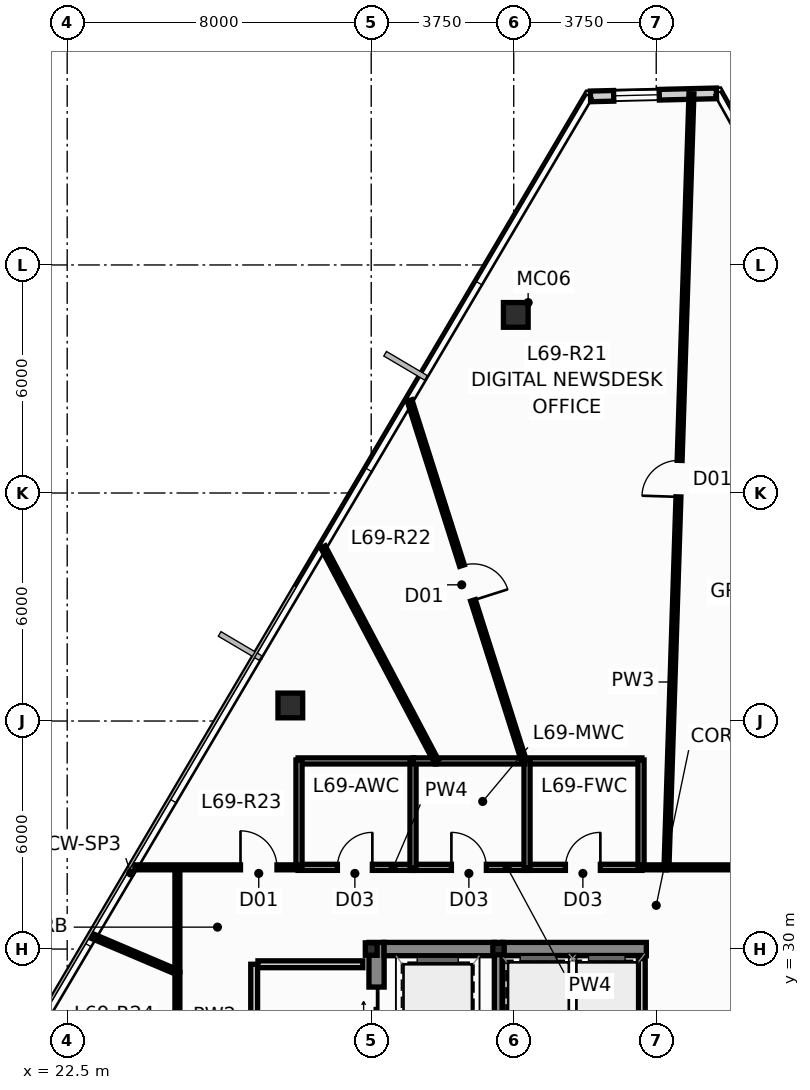
"""IFC4 building model, lengths in metres.
Left out: names, types, materials, properties, quantities, classifications, styles, units other than length and angle.
Written with IfcOpenShell. Run it as: python <this file> out.ifc"""

import sys

from ifc_helpers import new_model, si_unit, direction, frame, frame_2d, origin, origin_2d, place, context, subcontext, project, spatial, rectangle, hollow_rectangle, i_section, extrude, source, transform, mapped, element, fill, save


model = new_model("IFC4")
c1 = context("Model", 3, precision=1e-05, world=origin(), true_north=direction((0.0, 1.0)))
c2 = subcontext(c1, "Body", "Model", "MODEL_VIEW")
j1 = project(units=[si_unit("LENGTHUNIT", "METRE"), si_unit("PLANEANGLEUNIT", "RADIAN")], contexts=[c1])
p1 = place(None, origin())
s1 = spatial("IfcSite", under=j1, at=p1, CompositionType="ELEMENT")
p2 = place(p1, origin())
s2 = spatial("IfcBuilding", under=s1, at=p2, CompositionType="ELEMENT")
p3 = place(p2, frame((0.0, 0.0, 262.7)))
s3 = spatial("IfcBuildingStorey", under=s2, at=p3, CompositionType="ELEMENT", Elevation=262.7)
m1 = source(origin(), c2, "Body", "SweptSolid", [
    extrude(i_section(OverallWidth=0.311, OverallDepth=0.327, WebThickness=0.016, FlangeThickness=0.025, at=origin_2d()), origin(), (0.0, 0.0, 1.0), 3.65),
])
p4 = place(p3, frame((30.5, 30.0, 0.0), z_axis=(0.0, 0.0, 1.0), x_axis=(1.0, 0.0, 0.0)))
e1 = element("IfcColumn", 1, at=p4, inside=s3, PredefinedType="COLUMN", context=c2, shape_type="MappedRepresentation", body=[
    mapped(m1, transform((0.0, 0.0, 0.0), scale=1.0)),
])
m2 = source(origin(), c2, "Body", "SweptSolid", [
    extrude(hollow_rectangle(XDim=0.3, YDim=0.3, WallThickness=0.012, at=origin_2d()), origin(), (0.0, 0.0, 1.0), 3.65),
])
p5 = place(p3, frame((33.85, 30.0, 0.0), z_axis=(0.0, 0.0, 1.0), x_axis=(1.0, 0.0, 0.0)))
e2 = element("IfcColumn", 2, at=p5, inside=s3, PredefinedType="COLUMN", context=c2, shape_type="MappedRepresentation", body=[
    mapped(m2, transform((0.0, 0.0, 0.0), scale=1.0)),
])
p6 = place(p3, frame((30.64, 17.05, 0.0), z_axis=(0.0, 0.0, 1.0), x_axis=(0.0, 1.0, 0.0)))
e3 = element("IfcWall", 3, at=p6, inside=s3, PredefinedType="SHEAR", context=c2, shape_type="SweptSolid", body=[
    extrude(rectangle(XDim=13.125, YDim=0.4, at=frame_2d((6.562, 0.0))), origin(), (0.0, 0.0, 1.0), 3.65),
])
p7 = place(p6, frame((6.3, 0.0, 0.0)))
e4 = element("IfcOpeningElement", 4, at=p7, cuts=e3, PredefinedType="OPENING", context=c2, shape_type="SweptSolid", body=[
    extrude(rectangle(XDim=1.12, YDim=2.15, at=frame_2d((0.56, 1.075))), frame((0.0, 0.212, 0.0), z_axis=(0.0, -1.0, 0.0), x_axis=(1.0, 0.0, 0.0)), (0.0, 0.0, 1.0), 0.424),
])
p8 = place(p6, frame((10.75, 0.0, 0.0)))
e5 = element("IfcOpeningElement", 5, at=p8, cuts=e3, PredefinedType="OPENING", context=c2, shape_type="SweptSolid", body=[
    extrude(rectangle(XDim=1.2, YDim=2.2, at=frame_2d((0.6, 1.1))), frame((0.0, 0.212, 0.0), z_axis=(0.0, -1.0, 0.0), x_axis=(1.0, 0.0, 0.0)), (0.0, 0.0, 1.0), 0.424),
])
p9 = place(p3, frame((30.84, 30.0, 0.0), z_axis=(0.0, 0.0, 1.0), x_axis=(1.0, 0.0, 0.0)))
e6 = element("IfcWall", 6, at=p9, inside=s3, PredefinedType="SHEAR", context=c2, shape_type="SweptSolid", body=[
    extrude(rectangle(XDim=2.9, YDim=0.35, at=frame_2d((1.45, 0.0))), origin(), (0.0, 0.0, 1.0), 3.65),
])
p10 = place(p3, frame((33.96, 30.0, 0.0), z_axis=(0.0, 0.0, 1.0), x_axis=(1.0, 0.0, 0.0)))
e7 = element("IfcWall", 7, at=p10, inside=s3, PredefinedType="SHEAR", context=c2, shape_type="SweptSolid", body=[
    extrude(rectangle(XDim=3.78, YDim=0.35, at=frame_2d((1.89, 0.0))), origin(), (0.0, 0.0, 1.0), 3.65),
])
p11 = place(p3, frame((33.85, 17.05, 0.0), z_axis=(0.0, 0.0, 1.0), x_axis=(0.0, 1.0, 0.0)))
e8 = element("IfcWall", 8, at=p11, inside=s3, PredefinedType="SHEAR", context=c2, shape_type="SweptSolid", body=[
    extrude(rectangle(XDim=13.125, YDim=0.22, at=frame_2d((6.562, 0.0))), origin(), (0.0, 0.0, 1.0), 3.65),
])
m3 = source(origin(), c2, "Body", "SweptSolid", [
    extrude(hollow_rectangle(XDim=0.65, YDim=0.65, WallThickness=0.04, at=origin_2d()), origin(), (0.0, 0.0, 1.0), 3.651),
])
p12 = place(p3, frame((34.304, 46.686, 0.0), z_axis=(0.023871161178, 0.00173851594, 0.999713531581), x_axis=(-0.07263675076, 0.997358462359, 0.0)))
e9 = element("IfcColumn", 9, at=p12, inside=s3, PredefinedType="COLUMN", context=c2, shape_type="MappedRepresentation", body=[
    mapped(m3, transform((0.0, 0.0, 0.0), scale=1.0)),
])
m4 = source(origin(), c2, "Body", "SweptSolid", [
    extrude(hollow_rectangle(XDim=0.65, YDim=0.65, WallThickness=0.04, at=origin_2d()), origin(), (0.0, 0.0, 1.0), 3.651),
])
p13 = place(p3, frame((28.372, 36.41, 0.0), z_axis=(0.01939269685, -0.00601842316, 0.999793829693), x_axis=(0.296399214872, 0.955064136811, 0.0)))
e10 = element("IfcColumn", 10, at=p13, inside=s3, PredefinedType="COLUMN", context=c2, shape_type="MappedRepresentation", body=[
    mapped(m4, transform((0.0, 0.0, 0.0), scale=1.0)),
])
p14 = place(p3, frame((36.27, 52.436, 0.0), z_axis=(0.0, 0.0, 1.0), x_axis=(0.999711728511, 0.024009578864, 0.0)))
e11 = element("IfcWall", 11, at=p14, inside=s3, PredefinedType="STANDARD", context=c2, shape_type="SweptSolid", body=[
    extrude(rectangle(XDim=3.315, YDim=0.28, at=frame_2d((1.657, 0.0))), origin(), (0.0, 0.0, 1.0), 3.4),
])
p15 = place(p14, frame((0.61, 0.0, 0.9)))
e12 = element("IfcOpeningElement", 12, at=p15, cuts=e11, PredefinedType="OPENING", context=c2, shape_type="SweptSolid", body=[
    extrude(rectangle(XDim=1.2, YDim=1.65, at=frame_2d((0.6, 0.825))), frame((0.0, 0.152, 0.0), z_axis=(0.0, -1.0, 0.0), x_axis=(1.0, 0.0, 0.0)), (0.0, 0.0, 1.0), 0.304),
])
p16 = place(p3, frame((37.62, 27.64, 0.0), z_axis=(0.0, 0.0, 1.0), x_axis=(0.0, 1.0, 0.0)))
e13 = element("IfcWall", 13, at=p16, inside=s3, PredefinedType="PARTITIONING", context=c2, shape_type="SweptSolid", body=[
    extrude(rectangle(XDim=2.11, YDim=0.18, at=frame_2d((1.055, 0.0))), origin(), (0.0, 0.0, 1.0), 3.4),
])
p17 = place(p3, frame((27.42, 23.2, 0.0), z_axis=(0.0, 0.0, 1.0), x_axis=(0.0, 1.0, 0.0)))
e14 = element("IfcWall", 14, at=p17, inside=s3, PredefinedType="PARTITIONING", context=c2, shape_type="SweptSolid", body=[
    extrude(rectangle(XDim=6.4, YDim=0.18, at=frame_2d((3.2, 0.0))), origin(), (0.0, 0.0, 1.0), 3.085),
])
p18 = place(p17, frame((2.65, 0.0, 0.0)))
e15 = element("IfcOpeningElement", 15, at=p18, cuts=e14, PredefinedType="OPENING", context=c2, shape_type="SweptSolid", body=[
    extrude(rectangle(XDim=1.05, YDim=2.15, at=frame_2d((0.525, 1.075))), frame((0.0, 0.102, 0.0), z_axis=(0.0, -1.0, 0.0), x_axis=(1.0, 0.0, 0.0)), (0.0, 0.0, 1.0), 0.204),
])
p19 = place(p3, frame((27.52, 29.6, 0.0), z_axis=(0.0, 0.0, 1.0), x_axis=(1.0, 0.0, 0.0)))
e16 = element("IfcWall", 16, at=p19, inside=s3, PredefinedType="PARTITIONING", context=c2, shape_type="SweptSolid", body=[
    extrude(rectangle(XDim=2.76, YDim=0.18, at=frame_2d((1.38, 0.0))), origin(), (0.0, 0.0, 1.0), 3.4),
])
p20 = place(p3, frame((28.575, 32.15, 0.0), z_axis=(0.0, 0.0, 1.0), x_axis=(1.0, 0.0, 0.0)))
e17 = element("IfcWall", 17, at=p20, inside=s3, PredefinedType="PLUMBINGWALL", context=c2, shape_type="SweptSolid", body=[
    extrude(rectangle(XDim=3.05, YDim=0.16, at=frame_2d((1.525, 0.0))), origin(), (0.0, 0.0, 1.0), 3.085),
])
p21 = place(p20, frame((1.035, 0.0, 0.0)))
e18 = element("IfcOpeningElement", 18, at=p21, cuts=e17, PredefinedType="OPENING", context=c2, shape_type="SweptSolid", body=[
    extrude(rectangle(XDim=0.92, YDim=2.1, at=frame_2d((0.46, 1.05))), frame((0.0, 0.092, 0.0), z_axis=(0.0, -1.0, 0.0), x_axis=(1.0, 0.0, 0.0)), (0.0, 0.0, 1.0), 0.184),
])
p22 = place(p3, frame((31.575, 32.15, 0.0), z_axis=(0.0, 0.0, 1.0), x_axis=(1.0, 0.0, 0.0)))
e19 = element("IfcWall", 19, at=p22, inside=s3, PredefinedType="PLUMBINGWALL", context=c2, shape_type="SweptSolid", body=[
    extrude(rectangle(XDim=3.05, YDim=0.16, at=frame_2d((1.525, 0.0))), origin(), (0.0, 0.0, 1.0), 3.085),
])
p23 = place(p22, frame((1.035, 0.0, 0.0)))
e20 = element("IfcOpeningElement", 20, at=p23, cuts=e19, PredefinedType="OPENING", context=c2, shape_type="SweptSolid", body=[
    extrude(rectangle(XDim=0.92, YDim=2.1, at=frame_2d((0.46, 1.05))), frame((0.0, 0.092, 0.0), z_axis=(0.0, -1.0, 0.0), x_axis=(1.0, 0.0, 0.0)), (0.0, 0.0, 1.0), 0.184),
])
p24 = place(p3, frame((34.575, 32.15, 0.0), z_axis=(0.0, 0.0, 1.0), x_axis=(1.0, 0.0, 0.0)))
e21 = element("IfcWall", 21, at=p24, inside=s3, PredefinedType="PLUMBINGWALL", context=c2, shape_type="SweptSolid", body=[
    extrude(rectangle(XDim=3.05, YDim=0.16, at=frame_2d((1.525, 0.0))), origin(), (0.0, 0.0, 1.0), 3.085),
])
p25 = place(p24, frame((1.035, 0.0, 0.0)))
e22 = element("IfcOpeningElement", 22, at=p25, cuts=e21, PredefinedType="OPENING", context=c2, shape_type="SweptSolid", body=[
    extrude(rectangle(XDim=0.92, YDim=2.1, at=frame_2d((0.46, 1.05))), frame((0.0, 0.092, 0.0), z_axis=(0.0, -1.0, 0.0), x_axis=(1.0, 0.0, 0.0)), (0.0, 0.0, 1.0), 0.184),
])
for number, where, z_axis, x_axis in (
    (23, (28.575, 34.95, 0.0), (0.0, 0.0, 1.0), (1.0, 0.0, 0.0)),
    (24, (37.625, 34.95, 0.0), (0.0, 0.0, 1.0), (-1.0, 0.0, 0.0)),
):
    element("IfcWall", number, at=place(p3, frame(where, z_axis=z_axis, x_axis=x_axis)), inside=s3, PredefinedType="PLUMBINGWALL", context=c2, shape_type="SweptSolid", body=[
        extrude(rectangle(XDim=3.05, YDim=0.16, at=frame_2d((1.525, 0.0))), origin(), (0.0, 0.0, 1.0), 3.085),
    ])
for number, where, z_axis, x_axis in (
    (25, (31.6, 32.125, 0.0), (0.0, 0.0, 1.0), (0.0, 1.0, 0.0)),
    (26, (28.6, 32.125, 0.0), (0.0, 0.0, 1.0), (0.0, 1.0, 0.0)),
):
    element("IfcWall", number, at=place(p3, frame(where, z_axis=z_axis, x_axis=x_axis)), inside=s3, PredefinedType="PLUMBINGWALL", context=c2, shape_type="SweptSolid", body=[
        extrude(rectangle(XDim=2.85, YDim=0.16, at=frame_2d((1.425, 0.0))), origin(), (0.0, 0.0, 1.0), 2.985),
    ])
for number, where, z_axis, x_axis in (
    (27, (34.6, 32.125, 0.0), (0.0, 0.0, 1.0), (0.0, 1.0, 0.0)),
    (28, (37.6, 32.125, 0.0), (0.0, 0.0, 1.0), (0.0, 1.0, 0.0)),
):
    element("IfcWall", number, at=place(p3, frame(where, z_axis=z_axis, x_axis=x_axis)), inside=s3, PredefinedType="PLUMBINGWALL", context=c2, shape_type="SweptSolid", body=[
        extrude(rectangle(XDim=2.85, YDim=0.16, at=frame_2d((1.425, 0.0))), origin(), (0.0, 0.0, 1.0), 3.4),
    ])
p26 = place(p3, frame((32.185, 34.95, 0.0), z_axis=(0.0, 0.0, 1.0), x_axis=(1.0, 0.0, 0.0)))
e29 = element("IfcWall", 29, at=p26, inside=s3, PredefinedType="PLUMBINGWALL", context=c2, shape_type="SweptSolid", body=[
    extrude(rectangle(XDim=2.36, YDim=0.16, at=frame_2d((1.18, 0.0))), origin(), (0.0, 0.0, 1.0), 3.085),
])
p27 = place(p3, frame((31.605, 34.95, 0.0), z_axis=(0.0, 0.0, 1.0), x_axis=(1.0, 0.0, 0.0)))
e30 = element("IfcWall", 30, at=p27, inside=s3, PredefinedType="PLUMBINGWALL", context=c2, shape_type="SweptSolid", body=[
    extrude(rectangle(XDim=0.6, YDim=0.16, at=frame_2d((0.3, 0.0))), origin(), (0.0, 0.0, 1.0), 3.085),
])
p28 = place(p3, frame((38.27, 32.155, 0.0), z_axis=(0.0, 0.0, 1.0), x_axis=(0.032268342776, 0.999479241433, 0.0)))
e31 = element("IfcWall", 31, at=p28, inside=s3, PredefinedType="PARTITIONING", context=c2, shape_type="SweptSolid", body=[
    extrude(rectangle(XDim=20.36, YDim=0.13, at=frame_2d((10.18, 0.0))), origin(), (0.0, 0.0, 1.0), 3.4),
])
p29 = place(p28, frame((9.748, 0.0, 0.0)))
e32 = element("IfcOpeningElement", 32, at=p29, cuts=e31, PredefinedType="OPENING", context=c2, shape_type="SweptSolid", body=[
    extrude(rectangle(XDim=0.96, YDim=2.15, at=frame_2d((0.48, 1.075))), frame((0.0, 0.077, 0.0), z_axis=(0.0, -1.0, 0.0), x_axis=(1.0, 0.0, 0.0)), (0.0, 0.0, 1.0), 0.154),
])
p30 = place(p3, frame((31.51, 44.435, 0.0), z_axis=(0.0, 0.0, 1.0), x_axis=(0.302483210132, -0.953154713353, 0.0)))
e33 = element("IfcWall", 33, at=p30, inside=s3, PredefinedType="PARTITIONING", context=c2, shape_type="SweptSolid", body=[
    extrude(rectangle(XDim=9.946, YDim=0.13, at=frame_2d((4.973, 0.0))), origin(), (0.0, 0.0, 1.0), 3.4),
])
p31 = place(p30, frame((4.559, 0.0, 0.0)))
e34 = element("IfcOpeningElement", 34, at=p31, cuts=e33, PredefinedType="OPENING", context=c2, shape_type="SweptSolid", body=[
    extrude(rectangle(XDim=0.96, YDim=2.15, at=frame_2d((0.48, 1.075))), frame((0.0, 0.077, 0.0), z_axis=(0.0, -1.0, 0.0), x_axis=(1.0, 0.0, 0.0)), (0.0, 0.0, 1.0), 0.154),
])
p32 = place(p3, frame((25.4, 22.775, 0.0), z_axis=(0.0, 0.0, 1.0), x_axis=(0.0, 1.0, 0.0)))
e35 = element("IfcWall", 35, at=p32, inside=s3, PredefinedType="PARTITIONING", context=c2, shape_type="SweptSolid", body=[
    extrude(rectangle(XDim=6.61, YDim=0.13, at=frame_2d((3.305, 0.0))), origin(), (0.0, 0.0, 1.0), 3.085),
])
p33 = place(p32, frame((2.825, 0.0, 0.0)))
e36 = element("IfcOpeningElement", 36, at=p33, cuts=e35, PredefinedType="OPENING", context=c2, shape_type="SweptSolid", body=[
    extrude(rectangle(XDim=0.96, YDim=2.15, at=frame_2d((0.48, 1.075))), frame((0.0, 0.077, 0.0), z_axis=(0.0, -1.0, 0.0), x_axis=(1.0, 0.0, 0.0)), (0.0, 0.0, 1.0), 0.154),
])
p34 = place(p3, frame((29.233, 40.58, 0.0), z_axis=(0.0, 0.0, 1.0), x_axis=(0.467475229749, -0.884006170551, 0.0)))
e37 = element("IfcWall", 37, at=p34, inside=s3, PredefinedType="PARTITIONING", context=c2, shape_type="SweptSolid", body=[
    extrude(rectangle(XDim=6.364, YDim=0.13, at=frame_2d((3.182, 0.0))), origin(), (0.0, 0.0, 1.0), 3.4),
])
p35 = place(p3, frame((38.275, 32.15, 0.0), z_axis=(0.0, 0.0, 1.0), x_axis=(1.0, 0.0, 0.0)))
e38 = element("IfcWall", 38, at=p35, inside=s3, PredefinedType="PARTITIONING", context=c2, shape_type="SweptSolid", body=[
    extrude(rectangle(XDim=4.54, YDim=0.13, at=frame_2d((2.27, 0.0))), origin(), (0.0, 0.0, 1.0), 3.085),
])
p36 = place(p35, frame((1.79, 0.0, 0.0)))
e39 = element("IfcOpeningElement", 39, at=p36, cuts=e38, PredefinedType="OPENING", context=c2, shape_type="SweptSolid", body=[
    extrude(rectangle(XDim=0.96, YDim=2.15, at=frame_2d((0.48, 1.075))), frame((0.0, 0.077, 0.0), z_axis=(0.0, -1.0, 0.0), x_axis=(1.0, 0.0, 0.0)), (0.0, 0.0, 1.0), 0.154),
])
p37 = place(p3, frame((24.28, 32.15, 0.0), z_axis=(0.0, 0.0, 1.0), x_axis=(1.0, 0.0, 0.0)))
e40 = element("IfcWall", 40, at=p37, inside=s3, PredefinedType="PARTITIONING", context=c2, shape_type="SweptSolid", body=[
    extrude(rectangle(XDim=4.315, YDim=0.13, at=frame_2d((2.157, 0.0))), origin(), (0.0, 0.0, 1.0), 3.4),
])
p38 = place(p37, frame((2.78, 0.0, 0.0)))
e41 = element("IfcOpeningElement", 41, at=p38, cuts=e40, PredefinedType="OPENING", context=c2, shape_type="SweptSolid", body=[
    extrude(rectangle(XDim=0.96, YDim=2.15, at=frame_2d((0.48, 1.075))), frame((0.0, 0.077, 0.0), z_axis=(0.0, -1.0, 0.0), x_axis=(1.0, 0.0, 0.0)), (0.0, 0.0, 1.0), 0.154),
])
p39 = place(p3, frame((25.4, 29.395, 0.0), z_axis=(0.0, 0.0, 1.0), x_axis=(0.0, 1.0, 0.0)))
e42 = element("IfcWall", 42, at=p39, inside=s3, PredefinedType="PARTITIONING", context=c2, shape_type="SweptSolid", body=[
    extrude(rectangle(XDim=2.75, YDim=0.13, at=frame_2d((1.375, 0.0))), origin(), (0.0, 0.0, 1.0), 3.4),
])
p40 = place(p3, frame((23.181, 30.332, 0.0), z_axis=(0.0, 0.0, 1.0), x_axis=(0.920577358603, -0.390560272977, 0.0)))
e43 = element("IfcWall", 43, at=p40, inside=s3, PredefinedType="PARTITIONING", context=c2, shape_type="SweptSolid", body=[
    extrude(rectangle(XDim=2.406, YDim=0.13, at=frame_2d((1.203, 0.0))), origin(), (0.0, 0.0, 1.0), 3.4),
])
p41 = place(p3, frame((37.605, 32.15, 0.0), z_axis=(0.0, 0.0, 1.0), x_axis=(1.0, 0.0, 0.0)))
e44 = element("IfcWall", 44, at=p41, inside=s3, PredefinedType="PARTITIONING", context=c2, shape_type="SweptSolid", body=[
    extrude(rectangle(XDim=0.66, YDim=0.13, at=frame_2d((0.33, 0.0))), origin(), (0.0, 0.0, 1.0), 3.085),
])
p42 = place(p15, origin())
e45 = element("IfcWindow", 45, at=p42, inside=s3, PartitioningType="SINGLE_PANEL", PredefinedType="WINDOW", context=c2, shape_type="SweptSolid", body=[
    extrude(rectangle(XDim=1.2, YDim=1.65, at=frame_2d((0.6, 0.825))), frame((0.0, 0.03, 0.0), z_axis=(0.0, -1.0, 0.0), x_axis=(1.0, 0.0, 0.0)), (0.0, 0.0, 1.0), 0.06),
])
fill(e12, e45)
p43 = place(p8, origin())
e46 = element("IfcDoor", 46, at=p43, inside=s3, OperationType="SLIDING_TO_LEFT", PredefinedType="DOOR", context=c2, shape_type="SweptSolid", body=[
    extrude(rectangle(XDim=1.2, YDim=2.2, at=frame_2d((0.6, 1.1))), frame((0.0, 0.025, 0.0), z_axis=(0.0, -1.0, 0.0), x_axis=(1.0, 0.0, 0.0)), (0.0, 0.0, 1.0), 0.05),
])
fill(e5, e46)
p44 = place(p21, origin())
e47 = element("IfcDoor", 47, at=p44, inside=s3, OperationType="SINGLE_SWING_RIGHT", PredefinedType="DOOR", context=c2, shape_type="SweptSolid", body=[
    extrude(rectangle(XDim=0.92, YDim=2.1, at=frame_2d((0.46, 1.05))), frame((0.0, 0.025, 0.0), z_axis=(0.0, -1.0, 0.0), x_axis=(1.0, 0.0, 0.0)), (0.0, 0.0, 1.0), 0.05),
])
fill(e18, e47)
p45 = place(p23, origin())
e48 = element("IfcDoor", 48, at=p45, inside=s3, OperationType="SINGLE_SWING_LEFT", PredefinedType="DOOR", context=c2, shape_type="SweptSolid", body=[
    extrude(rectangle(XDim=0.92, YDim=2.1, at=frame_2d((0.46, 1.05))), frame((0.0, 0.025, 0.0), z_axis=(0.0, -1.0, 0.0), x_axis=(1.0, 0.0, 0.0)), (0.0, 0.0, 1.0), 0.05),
])
fill(e20, e48)
p46 = place(p25, origin())
e49 = element("IfcDoor", 49, at=p46, inside=s3, OperationType="SINGLE_SWING_RIGHT", PredefinedType="DOOR", context=c2, shape_type="SweptSolid", body=[
    extrude(rectangle(XDim=0.92, YDim=2.1, at=frame_2d((0.46, 1.05))), frame((0.0, 0.025, 0.0), z_axis=(0.0, -1.0, 0.0), x_axis=(1.0, 0.0, 0.0)), (0.0, 0.0, 1.0), 0.05),
])
fill(e22, e49)
p47 = place(p29, origin())
e50 = element("IfcDoor", 50, at=p47, inside=s3, OperationType="SINGLE_SWING_LEFT", PredefinedType="DOOR", context=c2, shape_type="SweptSolid", body=[
    extrude(rectangle(XDim=0.96, YDim=2.15, at=frame_2d((0.48, 1.075))), frame((0.0, 0.025, 0.0), z_axis=(0.0, -1.0, 0.0), x_axis=(1.0, 0.0, 0.0)), (0.0, 0.0, 1.0), 0.05),
])
fill(e32, e50)
p48 = place(p31, origin())
e51 = element("IfcDoor", 51, at=p48, inside=s3, OperationType="SINGLE_SWING_RIGHT", PredefinedType="DOOR", context=c2, shape_type="SweptSolid", body=[
    extrude(rectangle(XDim=0.96, YDim=2.15, at=frame_2d((0.48, 1.075))), frame((0.0, 0.025, 0.0), z_axis=(0.0, -1.0, 0.0), x_axis=(1.0, 0.0, 0.0)), (0.0, 0.0, 1.0), 0.05),
])
fill(e34, e51)
p49 = place(p38, origin())
e52 = element("IfcDoor", 52, at=p49, inside=s3, OperationType="SINGLE_SWING_LEFT", PredefinedType="DOOR", context=c2, shape_type="SweptSolid", body=[
    extrude(rectangle(XDim=0.96, YDim=2.15, at=frame_2d((0.48, 1.075))), frame((0.0, 0.025, 0.0), z_axis=(0.0, -1.0, 0.0), x_axis=(1.0, 0.0, 0.0)), (0.0, 0.0, 1.0), 0.05),
])
fill(e41, e52)
save(model, sys.argv[1])
